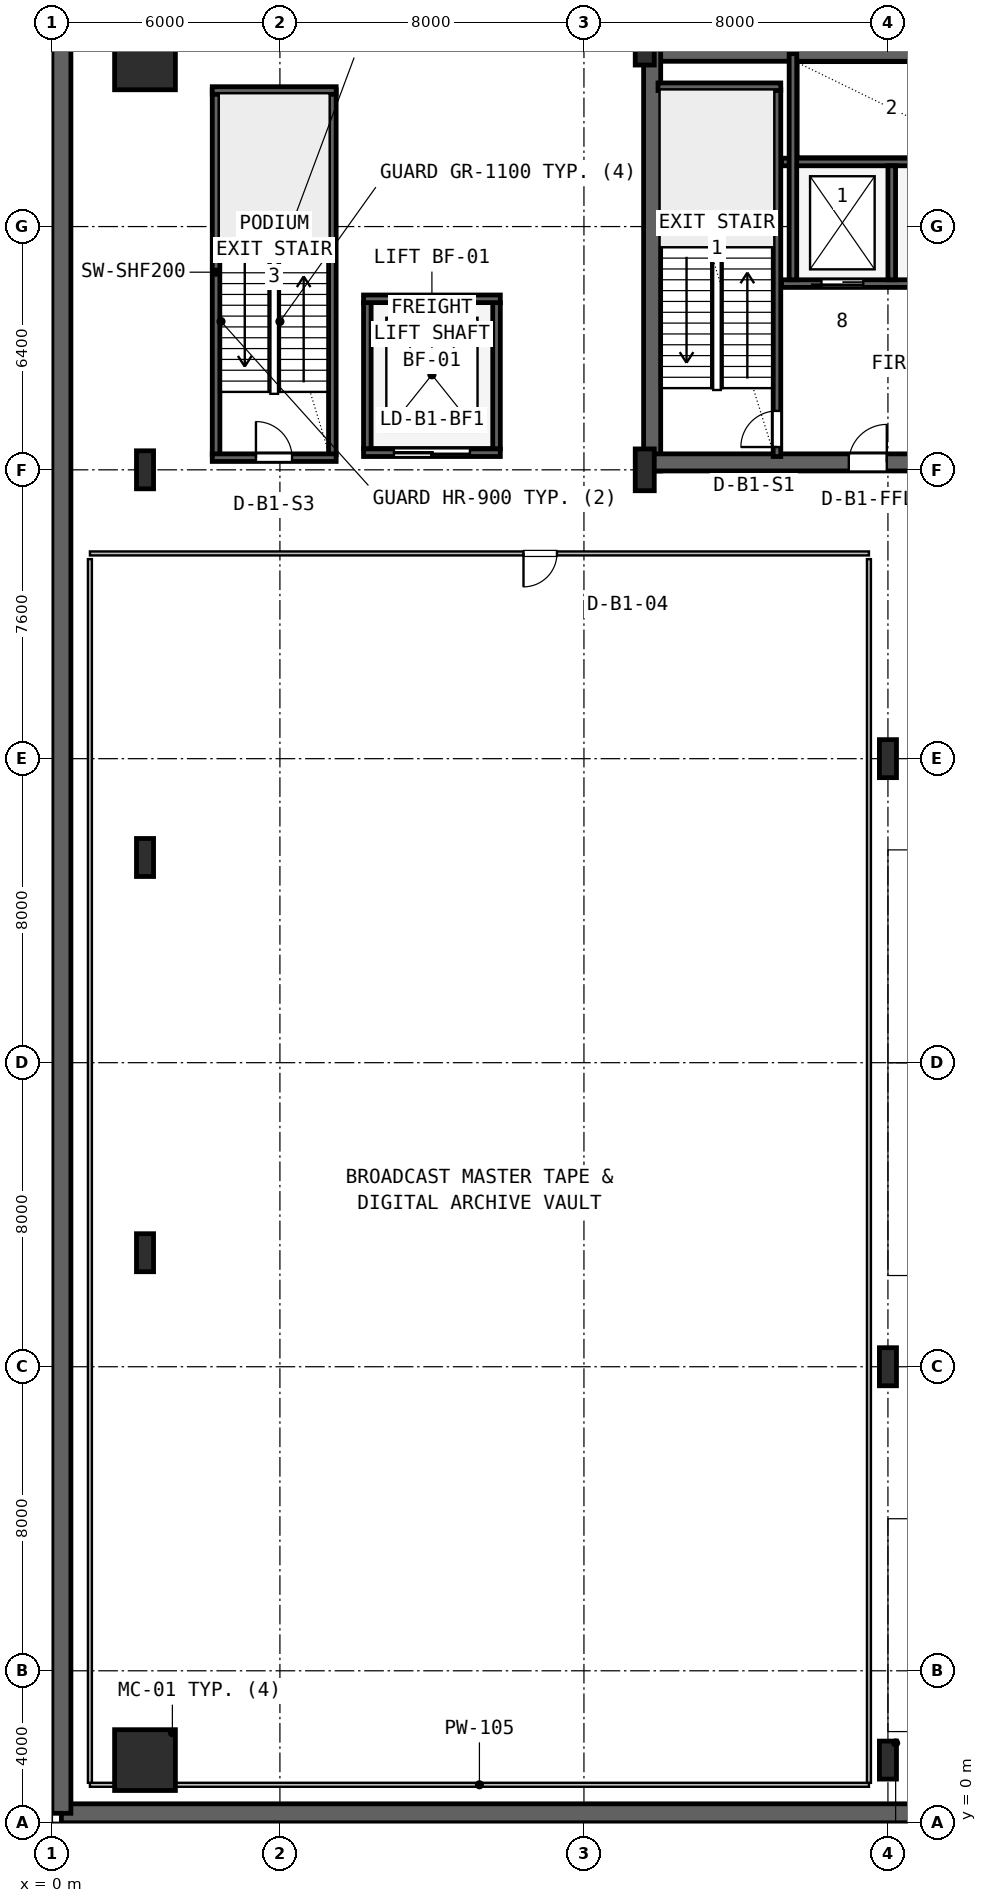
"""IFC4 building model, lengths in metres.
Left out: names, types, materials, properties, quantities, classifications, styles, units other than length and angle.
Written with IfcOpenShell. Run it as: python <this file> out.ifc"""

import sys

from ifc_helpers import new_model, si_unit, direction, frame, frame_2d, origin, origin_2d, place, context, subcontext, project, spatial, rectangle, hollow_rectangle, i_section, extrude, source, transform, mapped, element, fill, save


model = new_model("IFC4")
c1 = context("Model", 3, precision=1e-05, world=origin(), true_north=direction((0.0, 1.0)))
c2 = subcontext(c1, "Body", "Model", "MODEL_VIEW")
j1 = project(units=[si_unit("LENGTHUNIT", "METRE"), si_unit("PLANEANGLEUNIT", "RADIAN")], contexts=[c1])
p1 = place(None, origin())
s1 = spatial("IfcSite", under=j1, at=p1, CompositionType="ELEMENT")
p2 = place(p1, origin())
s2 = spatial("IfcBuilding", under=s1, at=p2, CompositionType="ELEMENT")
p3 = place(p2, frame((0.0, 0.0, -4.8)))
s3 = spatial("IfcBuildingStorey", under=s2, at=p3, CompositionType="ELEMENT", Elevation=-4.8)
p4 = place(p3, frame((0.25, 0.25, 0.0), z_axis=(0.0, 0.0, 1.0), x_axis=(1.0, 0.0, 0.0)))
e1 = element("IfcWall", 1, at=p4, inside=s3, PredefinedType="USERDEFINED", context=c2, shape_type="SweptSolid", body=[
    extrude(rectangle(XDim=67.5, YDim=0.5, at=frame_2d((33.75, 0.0))), origin(), (0.0, 0.0, 1.0), 4.48),
])
p5 = place(p3, frame((0.25, 47.75, 0.0), z_axis=(0.0, 0.0, 1.0), x_axis=(0.0, -1.0, 0.0)))
e2 = element("IfcWall", 2, at=p5, inside=s3, PredefinedType="USERDEFINED", context=c2, shape_type="SweptSolid", body=[
    extrude(rectangle(XDim=47.5, YDim=0.5, at=frame_2d((23.75, 0.0))), origin(), (0.0, 0.0, 1.0), 4.48),
])
p6 = place(p3, frame((15.6, 46.575, 0.0), z_axis=(0.0, 0.0, 1.0), x_axis=(1.0, 0.0, 0.0)))
e3 = element("IfcWall", 3, at=p6, inside=s3, PredefinedType="SHEAR", context=c2, shape_type="SweptSolid", body=[
    extrude(rectangle(XDim=36.8, YDim=0.45, at=frame_2d((18.4, 0.0))), origin(), (0.0, 0.0, 1.0), 4.48),
])
p7 = place(p3, frame((15.795, 35.57, 0.0), z_axis=(0.0, 0.0, 1.0), x_axis=(0.0, 1.0, 0.0)))
e4 = element("IfcWall", 4, at=p7, inside=s3, PredefinedType="SHEAR", context=c2, shape_type="SweptSolid", body=[
    extrude(rectangle(XDim=11.23, YDim=0.45, at=frame_2d((5.615, 0.0))), origin(), (0.0, 0.0, 1.0), 4.48),
])
p8 = place(p3, frame((15.57, 35.795, 0.0), z_axis=(0.0, 0.0, 1.0), x_axis=(1.0, 0.0, 0.0)))
e5 = element("IfcWall", 5, at=p8, inside=s3, PredefinedType="SHEAR", context=c2, shape_type="SweptSolid", body=[
    extrude(rectangle(XDim=9.23, YDim=0.45, at=frame_2d((4.615, 0.0))), origin(), (0.0, 0.0, 1.0), 4.48),
])
p9 = place(p8, frame((5.4, 0.0, 0.0)))
e6 = element("IfcOpeningElement", 6, at=p9, cuts=e5, PredefinedType="OPENING", context=c2, shape_type="SweptSolid", body=[
    extrude(rectangle(XDim=1.0, YDim=2.1, at=frame_2d((0.5, 1.05))), frame((0.0, 0.235, 0.0), z_axis=(0.0, -1.0, 0.0), x_axis=(1.0, 0.0, 0.0)), (0.0, 0.0, 1.0), 0.47),
])
m1 = source(origin(), c2, "Body", "SweptSolid", [
    extrude(i_section(OverallWidth=0.5, OverallDepth=1.1, WebThickness=0.018, FlangeThickness=0.032, FilletRadius=0.018, at=origin_2d()), origin(), (0.0, 0.0, 1.0), 4.8),
])
for number, where, z_axis, x_axis in (
    (7, (15.6, 35.6, 0.0), (0.0, 0.0, 1.0), (1.0, 0.0, 0.0)),
    (8, (15.6, 46.8, 0.0), (0.0, 0.0, 1.0), (1.0, 0.0, 0.0)),
):
    element("IfcColumn", number, at=place(p3, frame(where, z_axis=z_axis, x_axis=x_axis)), inside=s3, PredefinedType="COLUMN", context=c2, shape_type="MappedRepresentation", body=[
        mapped(m1, transform((0.0, 0.0, 0.0), x_axis=(1.0, 0.0, 0.0), y_axis=(0.0, 1.0, 0.0), z_axis=(0.0, 0.0, 1.0), scale=1.0)),
    ])
m2 = source(origin(), c2, "Body", "SweptSolid", [
    extrude(hollow_rectangle(XDim=1.6, YDim=1.6, WallThickness=0.06, at=origin_2d()), origin(), (0.0, 0.0, 1.0), 4.8),
])
for number, where, z_axis, x_axis in (
    (9, (2.45, 1.65, 0.0), (0.0, 0.0, 1.0), (1.0, 0.0, 0.0)),
    (10, (2.45, 46.4, 0.0), (0.0, 0.0, 1.0), (1.0, 0.0, 0.0)),
):
    element("IfcColumn", number, at=place(p3, frame(where, z_axis=z_axis, x_axis=x_axis)), inside=s3, PredefinedType="COLUMN", context=c2, shape_type="MappedRepresentation", body=[
        mapped(m2, transform((0.0, 0.0, 0.0), x_axis=(1.0, 0.0, 0.0), y_axis=(0.0, 1.0, 0.0), z_axis=(0.0, 0.0, 1.0), scale=1.0)),
    ])
m3 = source(origin(), c2, "Body", "SweptSolid", [
    extrude(i_section(OverallWidth=0.45, OverallDepth=1.0, WebThickness=0.016, FlangeThickness=0.03, FilletRadius=0.016, at=origin_2d()), origin(), (0.0, 0.0, 1.0), 4.8),
])
for number, where, z_axis, x_axis in (
    (11, (22.0, 1.65, 0.0), (0.0, 0.0, 1.0), (1.0, 0.0, 0.0)),
    (12, (22.0, 12.0, 0.0), (0.0, 0.0, 1.0), (1.0, 0.0, 0.0)),
    (13, (22.0, 28.0, 0.0), (0.0, 0.0, 1.0), (1.0, 0.0, 0.0)),
    (14, (2.45, 15.0, 0.0), (0.0, 0.0, 1.0), (1.0, 0.0, 0.0)),
    (15, (2.45, 25.4, 0.0), (0.0, 0.0, 1.0), (1.0, 0.0, 0.0)),
    (16, (2.45, 35.6, 0.0), (0.0, 0.0, 1.0), (1.0, 0.0, 0.0)),
):
    element("IfcColumn", number, at=place(p3, frame(where, z_axis=z_axis, x_axis=x_axis)), inside=s3, PredefinedType="COLUMN", context=c2, shape_type="MappedRepresentation", body=[
        mapped(m3, transform((0.0, 0.0, 0.0), x_axis=(1.0, 0.0, 0.0), y_axis=(0.0, 1.0, 0.0), z_axis=(0.0, 0.0, 1.0), scale=1.0)),
    ])
p10 = place(p3, frame((19.08, 35.95, 0.0), z_axis=(0.0, 0.0, 1.0), x_axis=(0.0, 1.0, 0.0)))
e17 = element("IfcWall", 17, at=p10, inside=s3, PredefinedType="SHEAR", context=c2, shape_type="SweptSolid", body=[
    extrude(rectangle(XDim=9.65, YDim=0.2, at=frame_2d((4.825, 0.0))), origin(), (0.0, 0.0, 1.0), 4.48),
])
p11 = place(p10, frame((0.25, 0.0, 0.0)))
e18 = element("IfcOpeningElement", 18, at=p11, cuts=e17, PredefinedType="OPENING", context=c2, shape_type="SweptSolid", body=[
    extrude(rectangle(XDim=0.95, YDim=2.1, at=frame_2d((0.475, 1.05))), frame((0.0, 0.11, 0.0), z_axis=(0.0, -1.0, 0.0), x_axis=(1.0, 0.0, 0.0)), (0.0, 0.0, 1.0), 0.22),
])
p12 = place(p3, frame((15.95, 45.68, 0.0), z_axis=(0.0, 0.0, 1.0), x_axis=(1.0, 0.0, 0.0)))
e19 = element("IfcWall", 19, at=p12, inside=s3, PredefinedType="SHEAR", context=c2, shape_type="SweptSolid", body=[
    extrude(rectangle(XDim=3.23, YDim=0.2, at=frame_2d((1.615, 0.0))), origin(), (0.0, 0.0, 1.0), 4.48),
])
p13 = place(p3, frame((19.2, 40.5, 0.0), z_axis=(0.0, 0.0, 1.0), x_axis=(1.0, 0.0, 0.0)))
e20 = element("IfcWall", 20, at=p13, inside=s3, PredefinedType="SHEAR", context=c2, shape_type="SweptSolid", body=[
    extrude(rectangle(XDim=5.52, YDim=0.2, at=frame_2d((2.76, 0.0))), origin(), (0.0, 0.0, 1.0), 4.48),
])
p14 = place(p13, frame((1.05, 0.0, 0.0)))
e21 = element("IfcOpeningElement", 21, at=p14, cuts=e20, PredefinedType="OPENING", context=c2, shape_type="SweptSolid", body=[
    extrude(rectangle(XDim=1.1, YDim=2.18, at=frame_2d((0.55, 1.09))), frame((0.0, 0.11, 0.0), z_axis=(0.0, -1.0, 0.0), x_axis=(1.0, 0.0, 0.0)), (0.0, 0.0, 1.0), 0.22),
])
p15 = place(p13, frame((3.65, 0.0, 0.0)))
e22 = element("IfcOpeningElement", 22, at=p15, cuts=e20, PredefinedType="OPENING", context=c2, shape_type="SweptSolid", body=[
    extrude(rectangle(XDim=1.1, YDim=2.18, at=frame_2d((0.55, 1.09))), frame((0.0, 0.11, 0.0), z_axis=(0.0, -1.0, 0.0), x_axis=(1.0, 0.0, 0.0)), (0.0, 0.0, 1.0), 0.22),
])
p16 = place(p3, frame((19.2, 43.7, 0.0), z_axis=(0.0, 0.0, 1.0), x_axis=(1.0, 0.0, 0.0)))
e23 = element("IfcWall", 23, at=p16, inside=s3, PredefinedType="SHEAR", context=c2, shape_type="SweptSolid", body=[
    extrude(rectangle(XDim=5.52, YDim=0.2, at=frame_2d((2.76, 0.0))), origin(), (0.0, 0.0, 1.0), 4.48),
])
p17 = place(p3, frame((22.1, 40.6, 0.0), z_axis=(0.0, 0.0, 1.0), x_axis=(0.0, 1.0, 0.0)))
e24 = element("IfcWall", 24, at=p17, inside=s3, PredefinedType="SHEAR", context=c2, shape_type="SweptSolid", body=[
    extrude(rectangle(XDim=3.0, YDim=0.2, at=frame_2d((1.5, 0.0))), origin(), (0.0, 0.0, 1.0), 4.48),
])
p18 = place(p3, frame((19.5, 40.6, 0.0), z_axis=(0.0, 0.0, 1.0), x_axis=(0.0, 1.0, 0.0)))
e25 = element("IfcWall", 25, at=p18, inside=s3, PredefinedType="SHEAR", context=c2, shape_type="SweptSolid", body=[
    extrude(rectangle(XDim=5.95, YDim=0.2, at=frame_2d((2.975, 0.0))), origin(), (0.0, 0.0, 1.0), 4.48),
])
for number, where, z_axis, x_axis in (
    (26, (4.32, 36.0, 0.0), (0.0, 0.0, 1.0), (0.0, 1.0, 0.0)),
    (27, (7.38, 36.0, 0.0), (0.0, 0.0, 1.0), (0.0, 1.0, 0.0)),
):
    element("IfcWall", number, at=place(p3, frame(where, z_axis=z_axis, x_axis=x_axis)), inside=s3, PredefinedType="SHEAR", context=c2, shape_type="SweptSolid", body=[
        extrude(rectangle(XDim=9.6, YDim=0.2, at=frame_2d((4.8, 0.0))), origin(), (0.0, 0.0, 1.0), 4.48),
    ])
p19 = place(p3, frame((4.22, 45.58, 0.0), z_axis=(0.0, 0.0, 1.0), x_axis=(1.0, 0.0, 0.0)))
e28 = element("IfcWall", 28, at=p19, inside=s3, PredefinedType="SHEAR", context=c2, shape_type="SweptSolid", body=[
    extrude(rectangle(XDim=3.26, YDim=0.2, at=frame_2d((1.63, 0.0))), origin(), (0.0, 0.0, 1.0), 4.48),
])
p20 = place(p3, frame((4.22, 35.92, 0.0), z_axis=(0.0, 0.0, 1.0), x_axis=(1.0, 0.0, 0.0)))
e29 = element("IfcWall", 29, at=p20, inside=s3, PredefinedType="SHEAR", context=c2, shape_type="SweptSolid", body=[
    extrude(rectangle(XDim=3.26, YDim=0.2, at=frame_2d((1.63, 0.0))), origin(), (0.0, 0.0, 1.0), 4.48),
])
p21 = place(p20, frame((1.15, 0.0, 0.0)))
e30 = element("IfcOpeningElement", 30, at=p21, cuts=e29, PredefinedType="OPENING", context=c2, shape_type="SweptSolid", body=[
    extrude(rectangle(XDim=0.95, YDim=2.1, at=frame_2d((0.475, 1.05))), frame((0.0, 0.11, 0.0), z_axis=(0.0, -1.0, 0.0), x_axis=(1.0, 0.0, 0.0)), (0.0, 0.0, 1.0), 0.22),
])
for number, where, z_axis, x_axis in (
    (31, (8.3, 36.15, 0.0), (0.0, 0.0, 1.0), (0.0, 1.0, 0.0)),
    (32, (11.7, 36.15, 0.0), (0.0, 0.0, 1.0), (0.0, 1.0, 0.0)),
):
    element("IfcWall", number, at=place(p3, frame(where, z_axis=z_axis, x_axis=x_axis)), inside=s3, PredefinedType="SHEAR", context=c2, shape_type="SweptSolid", body=[
        extrude(rectangle(XDim=3.85, YDim=0.2, at=frame_2d((1.925, 0.0))), origin(), (0.0, 0.0, 1.0), 4.48),
    ])
p22 = place(p3, frame((8.2, 40.1, 0.0), z_axis=(0.0, 0.0, 1.0), x_axis=(1.0, 0.0, 0.0)))
e33 = element("IfcWall", 33, at=p22, inside=s3, PredefinedType="SHEAR", context=c2, shape_type="SweptSolid", body=[
    extrude(rectangle(XDim=3.6, YDim=0.2, at=frame_2d((1.8, 0.0))), origin(), (0.0, 0.0, 1.0), 4.48),
])
p23 = place(p3, frame((8.2, 36.05, 0.0), z_axis=(0.0, 0.0, 1.0), x_axis=(1.0, 0.0, 0.0)))
e34 = element("IfcWall", 34, at=p23, inside=s3, PredefinedType="SHEAR", context=c2, shape_type="SweptSolid", body=[
    extrude(rectangle(XDim=3.6, YDim=0.2, at=frame_2d((1.8, 0.0))), origin(), (0.0, 0.0, 1.0), 4.48),
])
p24 = place(p23, frame((0.8, 0.0, 0.0)))
e35 = element("IfcOpeningElement", 35, at=p24, cuts=e34, PredefinedType="OPENING", context=c2, shape_type="SweptSolid", body=[
    extrude(rectangle(XDim=2.0, YDim=2.28, at=frame_2d((1.0, 1.14))), frame((0.0, 0.11, 0.0), z_axis=(0.0, -1.0, 0.0), x_axis=(1.0, 0.0, 0.0)), (0.0, 0.0, 1.0), 0.22),
])
p25 = place(p3, frame((1.0, 1.0, 0.0), z_axis=(0.0, 0.0, 1.0), x_axis=(1.0, 0.0, 0.0)))
e36 = element("IfcWall", 36, at=p25, inside=s3, PredefinedType="PARTITIONING", context=c2, shape_type="SweptSolid", body=[
    extrude(rectangle(XDim=20.5, YDim=0.105, at=frame_2d((10.25, 0.0))), origin(), (0.0, 0.0, 1.0), 3.275),
])
p26 = place(p3, frame((21.5, 1.052, 0.0), z_axis=(0.0, 0.0, 1.0), x_axis=(0.0, 1.0, 0.0)))
e37 = element("IfcWall", 37, at=p26, inside=s3, PredefinedType="PARTITIONING", context=c2, shape_type="SweptSolid", body=[
    extrude(rectangle(XDim=32.198, YDim=0.105, at=frame_2d((16.099, 0.0))), origin(), (0.0, 0.0, 1.0), 3.76),
])
p27 = place(p3, frame((1.0, 33.4, 0.0), z_axis=(0.0, 0.0, 1.0), x_axis=(1.0, 0.0, 0.0)))
e38 = element("IfcWall", 38, at=p27, inside=s3, PredefinedType="PARTITIONING", context=c2, shape_type="SweptSolid", body=[
    extrude(rectangle(XDim=20.5, YDim=0.105, at=frame_2d((10.25, 0.0))), origin(), (0.0, 0.0, 1.0), 3.76),
])
p28 = place(p27, frame((11.41, 0.0, 0.0)))
e39 = element("IfcOpeningElement", 39, at=p28, cuts=e38, PredefinedType="OPENING", context=c2, shape_type="SweptSolid", body=[
    extrude(rectangle(XDim=0.88, YDim=2.06, at=frame_2d((0.44, 1.03))), frame((0.0, 0.062, 0.0), z_axis=(0.0, -1.0, 0.0), x_axis=(1.0, 0.0, 0.0)), (0.0, 0.0, 1.0), 0.125),
])
p29 = place(p3, frame((1.0, 1.052, 0.0), z_axis=(0.0, 0.0, 1.0), x_axis=(0.0, 1.0, 0.0)))
e40 = element("IfcWall", 40, at=p29, inside=s3, PredefinedType="PARTITIONING", context=c2, shape_type="SweptSolid", body=[
    extrude(rectangle(XDim=32.198, YDim=0.105, at=frame_2d((16.099, 0.0))), origin(), (0.0, 0.0, 1.0), 4.46),
])
m4 = source(origin(), c2, "Body", "SweptSolid", [
    extrude(rectangle(XDim=0.95, YDim=2.1, at=frame_2d((0.475, 1.05))), frame((0.0, 0.025, 0.0), z_axis=(0.0, -1.0, 0.0), x_axis=(1.0, 0.0, 0.0)), (0.0, 0.0, 1.0), 0.05),
])
p30 = place(p11, origin())
e41 = element("IfcDoor", 41, at=p30, inside=s3, OperationType="SINGLE_SWING_LEFT", PredefinedType="DOOR", context=c2, shape_type="MappedRepresentation", body=[
    mapped(m4, transform((0.0, 0.0, 0.0), x_axis=(1.0, 0.0, 0.0), y_axis=(0.0, 1.0, 0.0), z_axis=(0.0, 0.0, 1.0), scale=1.0)),
])
fill(e18, e41)
m5 = source(origin(), c2, "Body", "SweptSolid", [
    extrude(rectangle(XDim=1.0, YDim=2.1, at=frame_2d((0.5, 1.05))), frame((0.0, 0.025, 0.0), z_axis=(0.0, -1.0, 0.0), x_axis=(1.0, 0.0, 0.0)), (0.0, 0.0, 1.0), 0.05),
])
p31 = place(p9, origin())
e42 = element("IfcDoor", 42, at=p31, inside=s3, OperationType="SINGLE_SWING_RIGHT", PredefinedType="DOOR", context=c2, shape_type="MappedRepresentation", body=[
    mapped(m5, transform((0.0, 0.0, 0.0), x_axis=(1.0, 0.0, 0.0), y_axis=(0.0, 1.0, 0.0), z_axis=(0.0, 0.0, 1.0), scale=1.0)),
])
fill(e6, e42)
m6 = source(origin(), c2, "Body", "SweptSolid", [
    extrude(rectangle(XDim=1.1, YDim=2.18, at=frame_2d((0.55, 1.09))), frame((0.0, 0.025, 0.0), z_axis=(0.0, -1.0, 0.0), x_axis=(1.0, 0.0, 0.0)), (0.0, 0.0, 1.0), 0.05),
])
p32 = place(p14, frame((1.1, 0.0, 0.0), z_axis=(0.0, 0.0, 1.0), x_axis=(-1.0, 0.0, 0.0)))
e43 = element("IfcDoor", 43, at=p32, inside=s3, OperationType="SLIDING_TO_LEFT", PredefinedType="DOOR", context=c2, shape_type="MappedRepresentation", body=[
    mapped(m6, transform((0.0, 0.0, 0.0), x_axis=(1.0, 0.0, 0.0), y_axis=(0.0, 1.0, 0.0), z_axis=(0.0, 0.0, 1.0), scale=1.0)),
])
fill(e21, e43)
p33 = place(p21, origin())
e44 = element("IfcDoor", 44, at=p33, inside=s3, OperationType="SINGLE_SWING_LEFT", PredefinedType="DOOR", context=c2, shape_type="MappedRepresentation", body=[
    mapped(m4, transform((0.0, 0.0, 0.0), x_axis=(1.0, 0.0, 0.0), y_axis=(0.0, 1.0, 0.0), z_axis=(0.0, 0.0, 1.0), scale=1.0)),
])
fill(e30, e44)
m7 = source(origin(), c2, "Body", "SweptSolid", [
    extrude(rectangle(XDim=2.0, YDim=2.28, at=frame_2d((1.0, 1.14))), frame((0.0, 0.025, 0.0), z_axis=(0.0, -1.0, 0.0), x_axis=(1.0, 0.0, 0.0)), (0.0, 0.0, 1.0), 0.05),
])
p34 = place(p24, frame((2.0, 0.0, 0.0), z_axis=(0.0, 0.0, 1.0), x_axis=(-1.0, 0.0, 0.0)))
e45 = element("IfcDoor", 45, at=p34, inside=s3, OperationType="DOUBLE_DOOR_SLIDING", PredefinedType="DOOR", context=c2, shape_type="MappedRepresentation", body=[
    mapped(m7, transform((0.0, 0.0, 0.0), x_axis=(1.0, 0.0, 0.0), y_axis=(0.0, 1.0, 0.0), z_axis=(0.0, 0.0, 1.0), scale=1.0)),
])
fill(e35, e45)
m8 = source(origin(), c2, "Body", "SweptSolid", [
    extrude(rectangle(XDim=0.88, YDim=2.06, at=frame_2d((0.44, 1.03))), frame((0.0, 0.025, 0.0), z_axis=(0.0, -1.0, 0.0), x_axis=(1.0, 0.0, 0.0)), (0.0, 0.0, 1.0), 0.05),
])
p35 = place(p28, frame((0.88, 0.0, 0.0), z_axis=(0.0, 0.0, 1.0), x_axis=(-1.0, 0.0, 0.0)))
e46 = element("IfcDoor", 46, at=p35, inside=s3, OperationType="SINGLE_SWING_LEFT", PredefinedType="DOOR", context=c2, shape_type="MappedRepresentation", body=[
    mapped(m8, transform((0.0, 0.0, 0.0), x_axis=(1.0, 0.0, 0.0), y_axis=(0.0, 1.0, 0.0), z_axis=(0.0, 0.0, 1.0), scale=1.0)),
])
fill(e39, e46)
save(model, sys.argv[1])
